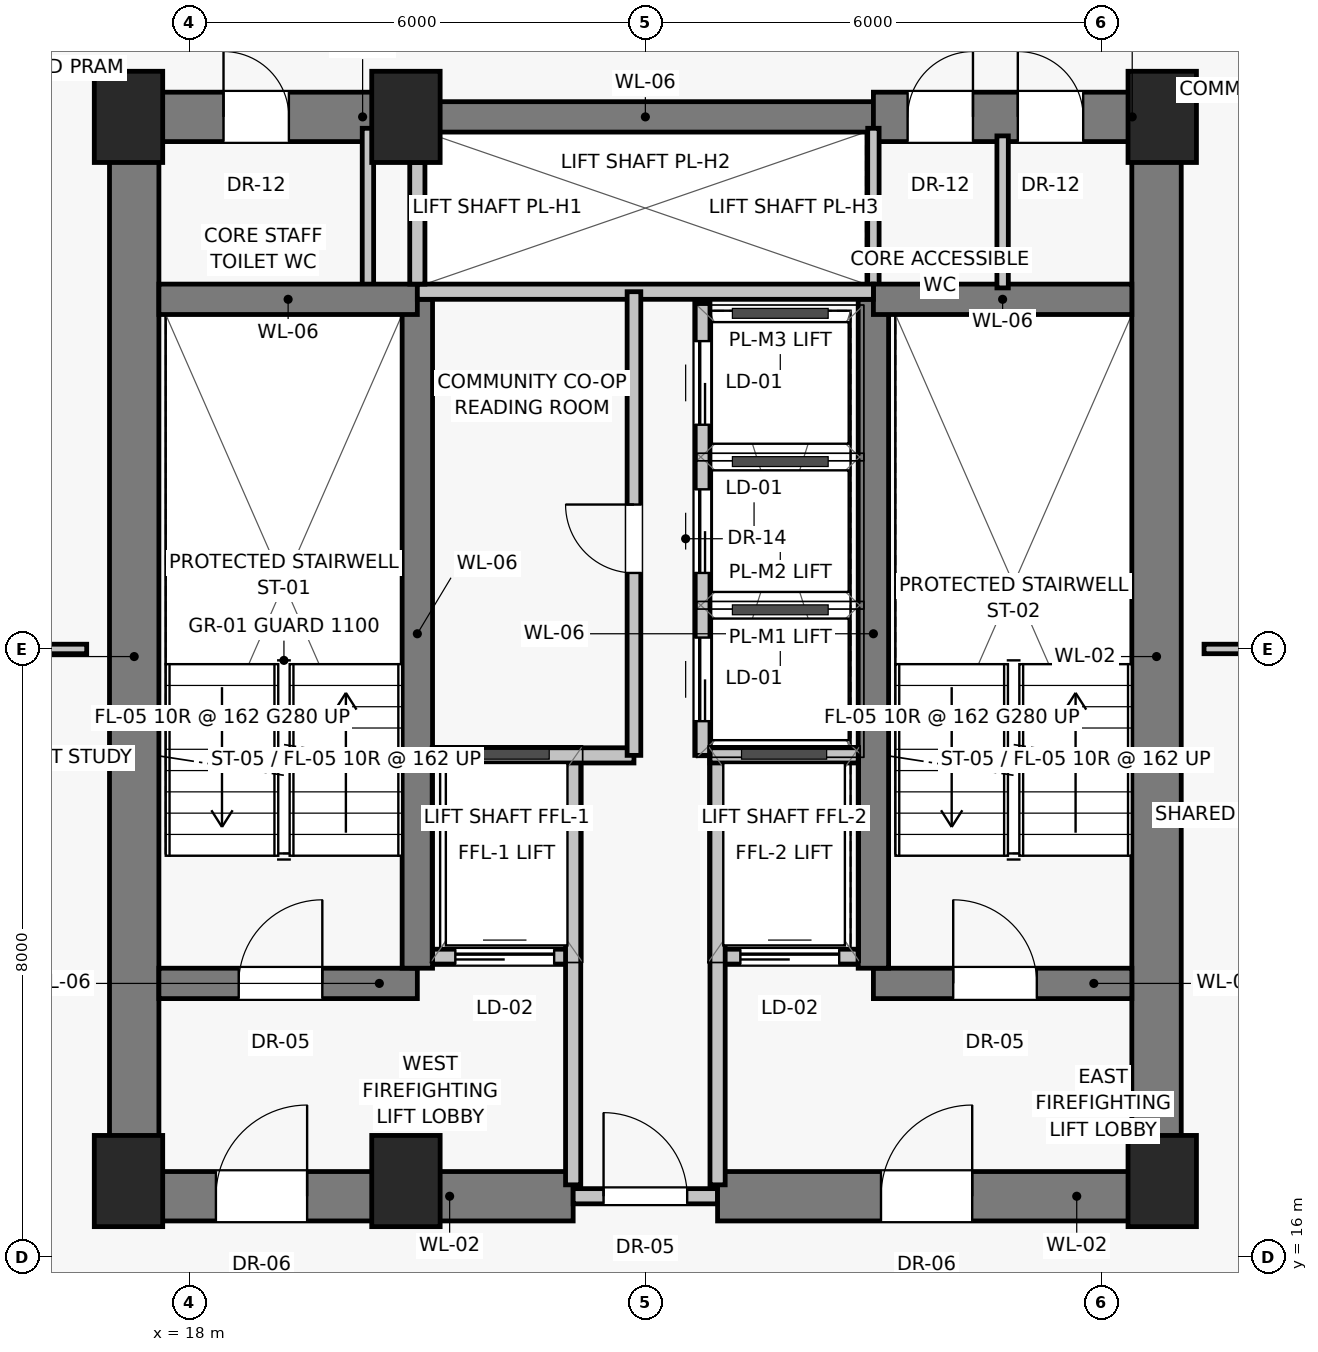
"""IFC4 building model, lengths in metres.
Left out: names, types, materials, properties, quantities, classifications, styles, units other than length and angle.
Written with IfcOpenShell. Run it as: python <this file> out.ifc"""

import sys

from ifc_helpers import new_model, si_unit, direction, frame, frame_2d, origin, origin_2d, place, context, subcontext, project, spatial, rectangle, extrude, source, transform, mapped, element, fill, save


model = new_model("IFC4")
c1 = context("Model", 3, precision=1e-05, world=origin(), true_north=direction((0.0, 1.0)))
c2 = subcontext(c1, "Body", "Model", "MODEL_VIEW")
j1 = project(units=[si_unit("LENGTHUNIT", "METRE"), si_unit("PLANEANGLEUNIT", "RADIAN")], contexts=[c1])
p1 = place(None, origin())
s1 = spatial("IfcSite", under=j1, at=p1, CompositionType="ELEMENT")
p2 = place(p1, origin())
s2 = spatial("IfcBuilding", under=s1, at=p2, CompositionType="ELEMENT")
p3 = place(p2, frame((0.0, 0.0, 123.0)))
s3 = spatial("IfcBuildingStorey", under=s2, at=p3, CompositionType="ELEMENT", Elevation=123.0)
for number, where, z_axis, x_axis in (
    (1, (17.2, 17.0, 0.0), (0.0, 0.0, 1.0), (1.0, 0.0, 0.0)),
    (2, (20.85, 17.0, 0.0), (0.0, 0.0, 1.0), (1.0, 0.0, 0.0)),
    (3, (30.8, 17.0, 0.0), (0.0, 0.0, 1.0), (1.0, 0.0, 0.0)),
    (4, (17.2, 31.0, 0.0), (0.0, 0.0, 1.0), (1.0, 0.0, 0.0)),
    (5, (20.85, 31.0, 0.0), (0.0, 0.0, 1.0), (1.0, 0.0, 0.0)),
    (6, (30.8, 31.0, 0.0), (0.0, 0.0, 1.0), (1.0, 0.0, 0.0)),
):
    element("IfcColumn", number, at=place(p3, frame(where, z_axis=z_axis, x_axis=x_axis)), inside=s3, PredefinedType="PILASTER", context=c2, shape_type="SweptSolid", body=[
        extrude(rectangle(XDim=0.9, YDim=1.2, at=origin_2d()), origin(), (0.0, 0.0, 1.0), 3.25),
    ])
for number, where, z_axis, x_axis in (
    (7, (17.275, 16.8, 0.0), (0.0, 0.0, 1.0), (0.0, 1.0, 0.0)),
    (8, (30.725, 16.8, 0.0), (0.0, 0.0, 1.0), (0.0, 1.0, 0.0)),
):
    element("IfcWall", number, at=place(p3, frame(where, z_axis=z_axis, x_axis=x_axis)), inside=s3, PredefinedType="SHEAR", context=c2, shape_type="SweptSolid", body=[
        extrude(rectangle(XDim=14.2, YDim=0.65, at=frame_2d((7.1, 0.0))), origin(), (0.0, 0.0, 1.0), 3.0),
    ])
p4 = place(p3, frame((17.2, 16.8, 0.0), z_axis=(0.0, 0.0, 1.0), x_axis=(1.0, 0.0, 0.0)))
e9 = element("IfcWall", 9, at=p4, inside=s3, PredefinedType="SHEAR", context=c2, shape_type="SweptSolid", body=[
    extrude(rectangle(XDim=5.85, YDim=0.65, at=frame_2d((2.925, 0.0))), origin(), (0.0, 0.0, 1.0), 3.0),
])
p5 = place(p4, frame((1.15, 0.0, 0.0)))
e10 = element("IfcOpeningElement", 10, at=p5, cuts=e9, PredefinedType="OPENING", context=c2, shape_type="SweptSolid", body=[
    extrude(rectangle(XDim=1.2, YDim=2.03, at=frame_2d((0.6, 1.015))), frame((0.0, 0.335, 0.0), z_axis=(0.0, -1.0, 0.0), x_axis=(1.0, 0.0, 0.0)), (0.0, 0.0, 1.0), 0.67),
])
p6 = place(p3, frame((23.05, 16.8, 0.0), z_axis=(0.0, 0.0, 1.0), x_axis=(1.0, 0.0, 0.0)))
e11 = element("IfcWall", 11, at=p6, inside=s3, PredefinedType="SOLIDWALL", context=c2, shape_type="SweptSolid", body=[
    extrude(rectangle(XDim=1.9, YDim=0.2, at=frame_2d((0.95, 0.0))), origin(), (0.0, 0.0, 1.0), 2.15),
])
p7 = place(p6, frame((0.4, 0.0, 0.0)))
e12 = element("IfcOpeningElement", 12, at=p7, cuts=e11, PredefinedType="OPENING", context=c2, shape_type="SweptSolid", body=[
    extrude(rectangle(XDim=1.1, YDim=2.03, at=frame_2d((0.55, 1.015))), frame((0.0, 0.11, 0.0), z_axis=(0.0, -1.0, 0.0), x_axis=(1.0, 0.0, 0.0)), (0.0, 0.0, 1.0), 0.22),
])
p8 = place(p3, frame((24.95, 16.8, 0.0), z_axis=(0.0, 0.0, 1.0), x_axis=(1.0, 0.0, 0.0)))
e13 = element("IfcWall", 13, at=p8, inside=s3, PredefinedType="SHEAR", context=c2, shape_type="SweptSolid", body=[
    extrude(rectangle(XDim=5.85, YDim=0.65, at=frame_2d((2.925, 0.0))), origin(), (0.0, 0.0, 1.0), 3.0),
])
p9 = place(p8, frame((2.15, 0.0, 0.0)))
e14 = element("IfcOpeningElement", 14, at=p9, cuts=e13, PredefinedType="OPENING", context=c2, shape_type="SweptSolid", body=[
    extrude(rectangle(XDim=1.2, YDim=2.03, at=frame_2d((0.6, 1.015))), frame((0.0, 0.335, 0.0), z_axis=(0.0, -1.0, 0.0), x_axis=(1.0, 0.0, 0.0)), (0.0, 0.0, 1.0), 0.67),
])
p10 = place(p3, frame((17.2, 31.0, 0.0), z_axis=(0.0, 0.0, 1.0), x_axis=(1.0, 0.0, 0.0)))
e15 = element("IfcWall", 15, at=p10, inside=s3, PredefinedType="SHEAR", context=c2, shape_type="SweptSolid", body=[
    extrude(rectangle(XDim=3.8, YDim=0.65, at=frame_2d((1.9, 0.0))), origin(), (0.0, 0.0, 1.0), 3.0),
])
p11 = place(p10, frame((1.25, 0.0, 0.0)))
e16 = element("IfcOpeningElement", 16, at=p11, cuts=e15, PredefinedType="OPENING", context=c2, shape_type="SweptSolid", body=[
    extrude(rectangle(XDim=0.86, YDim=2.01, at=frame_2d((0.43, 1.005))), frame((0.0, 0.335, 0.0), z_axis=(0.0, -1.0, 0.0), x_axis=(1.0, 0.0, 0.0)), (0.0, 0.0, 1.0), 0.67),
])
p12 = place(p3, frame((21.0, 31.0, 0.0), z_axis=(0.0, 0.0, 1.0), x_axis=(1.0, 0.0, 0.0)))
e17 = element("IfcWall", 17, at=p12, inside=s3, PredefinedType="SHEAR", context=c2, shape_type="SweptSolid", body=[
    extrude(rectangle(XDim=6.0, YDim=0.4, at=frame_2d((3.0, 0.0))), origin(), (0.0, 0.0, 1.0), 3.0),
])
p13 = place(p3, frame((27.0, 31.0, 0.0), z_axis=(0.0, 0.0, 1.0), x_axis=(1.0, 0.0, 0.0)))
e18 = element("IfcWall", 18, at=p13, inside=s3, PredefinedType="SHEAR", context=c2, shape_type="SweptSolid", body=[
    extrude(rectangle(XDim=3.8, YDim=0.65, at=frame_2d((1.9, 0.0))), origin(), (0.0, 0.0, 1.0), 3.0),
])
p14 = place(p13, frame((0.45, 0.0, 0.0)))
e19 = element("IfcOpeningElement", 19, at=p14, cuts=e18, PredefinedType="OPENING", context=c2, shape_type="SweptSolid", body=[
    extrude(rectangle(XDim=0.86, YDim=2.01, at=frame_2d((0.43, 1.005))), frame((0.0, 0.335, 0.0), z_axis=(0.0, -1.0, 0.0), x_axis=(1.0, 0.0, 0.0)), (0.0, 0.0, 1.0), 0.67),
])
p15 = place(p13, frame((1.9, 0.0, 0.0)))
e20 = element("IfcOpeningElement", 20, at=p15, cuts=e18, PredefinedType="OPENING", context=c2, shape_type="SweptSolid", body=[
    extrude(rectangle(XDim=0.86, YDim=2.01, at=frame_2d((0.43, 1.005))), frame((0.0, 0.335, 0.0), z_axis=(0.0, -1.0, 0.0), x_axis=(1.0, 0.0, 0.0)), (0.0, 0.0, 1.0), 0.67),
])
for number, where, z_axis, x_axis in (
    (21, (20.35, 28.65, 0.0), (0.0, 0.0, 1.0), (0.0, 1.0, 0.0)),
    (22, (27.0, 28.65, 0.0), (0.0, 0.0, 1.0), (0.0, 1.0, 0.0)),
):
    element("IfcWall", number, at=place(p3, frame(where, z_axis=z_axis, x_axis=x_axis)), inside=s3, PredefinedType="PARTITIONING", context=c2, shape_type="SweptSolid", body=[
        extrude(rectangle(XDim=2.2, YDim=0.15, at=frame_2d((1.1, 0.0))), origin(), (0.0, 0.0, 1.0), 3.0),
    ])
p16 = place(p3, frame((17.6, 19.6, 0.0), z_axis=(0.0, 0.0, 1.0), x_axis=(1.0, 0.0, 0.0)))
e23 = element("IfcWall", 23, at=p16, inside=s3, PredefinedType="SHEAR", context=c2, shape_type="SweptSolid", body=[
    extrude(rectangle(XDim=3.4, YDim=0.4, at=frame_2d((1.7, 0.0))), origin(), (0.0, 0.0, 1.0), 3.0),
])
p17 = place(p16, frame((1.05, 0.0, 0.0)))
e24 = element("IfcOpeningElement", 24, at=p17, cuts=e23, PredefinedType="OPENING", context=c2, shape_type="SweptSolid", body=[
    extrude(rectangle(XDim=1.1, YDim=2.03, at=frame_2d((0.55, 1.015))), frame((0.0, 0.21, 0.0), z_axis=(0.0, -1.0, 0.0), x_axis=(1.0, 0.0, 0.0)), (0.0, 0.0, 1.0), 0.42),
])
p18 = place(p3, frame((21.2, 19.95, 0.0), z_axis=(0.0, 0.0, 1.0), x_axis=(1.0, 0.0, 0.0)))
e25 = element("IfcWall", 25, at=p18, inside=s3, PredefinedType="SOLIDWALL", context=c2, shape_type="SweptSolid", body=[
    extrude(rectangle(XDim=1.85, YDim=0.2, at=frame_2d((0.925, 0.0))), origin(), (0.0, 0.0, 1.0), 3.0),
])
p19 = place(p18, frame((0.3, 0.0, 0.0)))
e26 = element("IfcOpeningElement", 26, at=p19, cuts=e25, PredefinedType="OPENING", context=c2, shape_type="SweptSolid", body=[
    extrude(rectangle(XDim=1.3, YDim=2.25, at=frame_2d((0.65, 1.125))), frame((0.0, 0.11, 0.0), z_axis=(0.0, -1.0, 0.0), x_axis=(1.0, 0.0, 0.0)), (0.0, 0.0, 1.0), 0.22),
])
p20 = place(p3, frame((24.95, 19.95, 0.0), z_axis=(0.0, 0.0, 1.0), x_axis=(1.0, 0.0, 0.0)))
e27 = element("IfcWall", 27, at=p20, inside=s3, PredefinedType="SOLIDWALL", context=c2, shape_type="SweptSolid", body=[
    extrude(rectangle(XDim=1.85, YDim=0.2, at=frame_2d((0.925, 0.0))), origin(), (0.0, 0.0, 1.0), 3.0),
])
p21 = place(p20, frame((0.3, 0.0, 0.0)))
e28 = element("IfcOpeningElement", 28, at=p21, cuts=e27, PredefinedType="OPENING", context=c2, shape_type="SweptSolid", body=[
    extrude(rectangle(XDim=1.3, YDim=2.25, at=frame_2d((0.65, 1.125))), frame((0.0, 0.11, 0.0), z_axis=(0.0, -1.0, 0.0), x_axis=(1.0, 0.0, 0.0)), (0.0, 0.0, 1.0), 0.22),
])
p22 = place(p3, frame((27.0, 19.6, 0.0), z_axis=(0.0, 0.0, 1.0), x_axis=(1.0, 0.0, 0.0)))
e29 = element("IfcWall", 29, at=p22, inside=s3, PredefinedType="SHEAR", context=c2, shape_type="SweptSolid", body=[
    extrude(rectangle(XDim=3.4, YDim=0.4, at=frame_2d((1.7, 0.0))), origin(), (0.0, 0.0, 1.0), 3.0),
])
p23 = place(p22, frame((1.05, 0.0, 0.0)))
e30 = element("IfcOpeningElement", 30, at=p23, cuts=e29, PredefinedType="OPENING", context=c2, shape_type="SweptSolid", body=[
    extrude(rectangle(XDim=1.1, YDim=2.03, at=frame_2d((0.55, 1.015))), frame((0.0, 0.21, 0.0), z_axis=(0.0, -1.0, 0.0), x_axis=(1.0, 0.0, 0.0)), (0.0, 0.0, 1.0), 0.42),
])
for number, where, z_axis, x_axis in (
    (31, (21.0, 19.8, 0.0), (0.0, 0.0, 1.0), (0.0, 1.0, 0.0)),
    (32, (27.0, 19.8, 0.0), (0.0, 0.0, 1.0), (0.0, 1.0, 0.0)),
):
    element("IfcWall", number, at=place(p3, frame(where, z_axis=z_axis, x_axis=x_axis)), inside=s3, PredefinedType="SHEAR", context=c2, shape_type="SweptSolid", body=[
        extrude(rectangle(XDim=8.8, YDim=0.4, at=frame_2d((4.4, 0.0))), origin(), (0.0, 0.0, 1.0), 3.0),
    ])
for number, where, z_axis, x_axis in (
    (33, (17.6, 28.6, 0.0), (0.0, 0.0, 1.0), (1.0, 0.0, 0.0)),
    (34, (27.0, 28.6, 0.0), (0.0, 0.0, 1.0), (1.0, 0.0, 0.0)),
):
    element("IfcWall", number, at=place(p3, frame(where, z_axis=z_axis, x_axis=x_axis)), inside=s3, PredefinedType="SHEAR", context=c2, shape_type="SweptSolid", body=[
        extrude(rectangle(XDim=3.4, YDim=0.4, at=frame_2d((1.7, 0.0))), origin(), (0.0, 0.0, 1.0), 3.0),
    ])
for number, where, z_axis, x_axis in (
    (35, (23.05, 16.95, 0.0), (0.0, 0.0, 1.0), (0.0, 1.0, 0.0)),
    (36, (24.95, 16.95, 0.0), (0.0, 0.0, 1.0), (0.0, 1.0, 0.0)),
):
    element("IfcWall", number, at=place(p3, frame(where, z_axis=z_axis, x_axis=x_axis)), inside=s3, PredefinedType="SOLIDWALL", context=c2, shape_type="SweptSolid", body=[
        extrude(rectangle(XDim=5.6, YDim=0.2, at=frame_2d((2.8, 0.0))), origin(), (0.0, 0.0, 1.0), 3.0),
    ])
p24 = place(p3, frame((21.2, 22.6, 0.0), z_axis=(0.0, 0.0, 1.0), x_axis=(1.0, 0.0, 0.0)))
e37 = element("IfcWall", 37, at=p24, inside=s3, PredefinedType="SOLIDWALL", context=c2, shape_type="SweptSolid", body=[
    extrude(rectangle(XDim=2.65, YDim=0.2, at=frame_2d((1.325, 0.0))), origin(), (0.0, 0.0, 1.0), 3.0),
])
p25 = place(p3, frame((24.85, 22.6, 0.0), z_axis=(0.0, 0.0, 1.0), x_axis=(1.0, 0.0, 0.0)))
e38 = element("IfcWall", 38, at=p25, inside=s3, PredefinedType="SOLIDWALL", context=c2, shape_type="SweptSolid", body=[
    extrude(rectangle(XDim=1.95, YDim=0.2, at=frame_2d((0.975, 0.0))), origin(), (0.0, 0.0, 1.0), 3.0),
])
p26 = place(p3, frame((21.0, 28.7, 0.0), z_axis=(0.0, 0.0, 1.0), x_axis=(1.0, 0.0, 0.0)))
e39 = element("IfcWall", 39, at=p26, inside=s3, PredefinedType="SOLIDWALL", context=c2, shape_type="SweptSolid", body=[
    extrude(rectangle(XDim=6.0, YDim=0.2, at=frame_2d((3.0, 0.0))), origin(), (0.0, 0.0, 1.0), 3.0),
])
p27 = place(p3, frame((21.0, 28.8, 0.0), z_axis=(0.0, 0.0, 1.0), x_axis=(0.0, 1.0, 0.0)))
e40 = element("IfcWall", 40, at=p27, inside=s3, PredefinedType="SOLIDWALL", context=c2, shape_type="SweptSolid", body=[
    extrude(rectangle(XDim=1.6, YDim=0.2, at=frame_2d((0.8, 0.0))), origin(), (0.0, 0.0, 1.0), 3.0),
])
p28 = place(p3, frame((23.85, 22.6, 0.0), z_axis=(0.0, 0.0, 1.0), x_axis=(0.0, 1.0, 0.0)))
e41 = element("IfcWall", 41, at=p28, inside=s3, PredefinedType="PARTITIONING", context=c2, shape_type="SweptSolid", body=[
    extrude(rectangle(XDim=6.1, YDim=0.18, at=frame_2d((3.05, 0.0))), origin(), (0.0, 0.0, 1.0), 3.0),
])
p29 = place(p28, frame((2.4, 0.0, 0.0)))
e42 = element("IfcOpeningElement", 42, at=p29, cuts=e41, PredefinedType="OPENING", context=c2, shape_type="SweptSolid", body=[
    extrude(rectangle(XDim=0.9, YDim=2.01, at=frame_2d((0.45, 1.005))), frame((0.0, 0.1, 0.0), z_axis=(0.0, -1.0, 0.0), x_axis=(1.0, 0.0, 0.0)), (0.0, 0.0, 1.0), 0.2),
])
p30 = place(p3, frame((24.75, 22.6, 0.0), z_axis=(0.0, 0.0, 1.0), x_axis=(0.0, 1.0, 0.0)))
e43 = element("IfcWall", 43, at=p30, inside=s3, PredefinedType="SOLIDWALL", context=c2, shape_type="SweptSolid", body=[
    extrude(rectangle(XDim=5.95, YDim=0.2, at=frame_2d((2.975, 0.0))), origin(), (0.0, 0.0, 1.0), 3.0),
])
p31 = place(p30, frame((0.45, 0.0, 0.0)))
e44 = element("IfcOpeningElement", 44, at=p31, cuts=e43, PredefinedType="OPENING", context=c2, shape_type="SweptSolid", body=[
    extrude(rectangle(XDim=1.1, YDim=2.08, at=frame_2d((0.55, 1.04))), frame((0.0, 0.11, 0.0), z_axis=(0.0, -1.0, 0.0), x_axis=(1.0, 0.0, 0.0)), (0.0, 0.0, 1.0), 0.22),
])
p32 = place(p30, frame((2.4, 0.0, 0.0)))
e45 = element("IfcOpeningElement", 45, at=p32, cuts=e43, PredefinedType="OPENING", context=c2, shape_type="SweptSolid", body=[
    extrude(rectangle(XDim=1.1, YDim=2.08, at=frame_2d((0.55, 1.04))), frame((0.0, 0.11, 0.0), z_axis=(0.0, -1.0, 0.0), x_axis=(1.0, 0.0, 0.0)), (0.0, 0.0, 1.0), 0.22),
])
p33 = place(p30, frame((4.35, 0.0, 0.0)))
e46 = element("IfcOpeningElement", 46, at=p33, cuts=e43, PredefinedType="OPENING", context=c2, shape_type="SweptSolid", body=[
    extrude(rectangle(XDim=1.1, YDim=2.08, at=frame_2d((0.55, 1.04))), frame((0.0, 0.11, 0.0), z_axis=(0.0, -1.0, 0.0), x_axis=(1.0, 0.0, 0.0)), (0.0, 0.0, 1.0), 0.22),
])
p34 = place(p3, frame((28.7, 28.75, 0.0), z_axis=(0.0, 0.0, 1.0), x_axis=(0.0, 1.0, 0.0)))
e47 = element("IfcWall", 47, at=p34, inside=s3, PredefinedType="PARTITIONING", context=c2, shape_type="SweptSolid", body=[
    extrude(rectangle(XDim=2.0, YDim=0.15, at=frame_2d((1.0, 0.0))), origin(), (0.0, 0.0, 1.0), 3.0),
])
for number, where, z_axis, x_axis in (
    (48, (14.55, 24.0, 0.0), (0.0, 0.0, 1.0), (1.0, 0.0, 0.0)),
    (49, (31.35, 24.0, 0.0), (0.0, 0.0, 1.0), (1.0, 0.0, 0.0)),
):
    element("IfcWall", number, at=place(p3, frame(where, z_axis=z_axis, x_axis=x_axis)), inside=s3, PredefinedType="PARTITIONING", context=c2, shape_type="SweptSolid", body=[
        extrude(rectangle(XDim=2.1, YDim=0.125, at=frame_2d((1.05, 0.0))), origin(), (0.0, 0.0, 1.0), 3.0),
    ])
m1 = source(origin(), c2, "Body", "SweptSolid", [
    extrude(rectangle(XDim=1.2, YDim=2.03, at=frame_2d((0.6, 1.015))), frame((0.0, 0.025, 0.0), z_axis=(0.0, -1.0, 0.0), x_axis=(1.0, 0.0, 0.0)), (0.0, 0.0, 1.0), 0.05),
])
p35 = place(p5, origin())
e50 = element("IfcDoor", 50, at=p35, inside=s3, OperationType="SINGLE_SWING_RIGHT", PredefinedType="DOOR", context=c2, shape_type="MappedRepresentation", body=[
    mapped(m1, transform((0.0, 0.0, 0.0), scale=1.0)),
])
fill(e10, e50)
m2 = source(origin(), c2, "Body", "SweptSolid", [
    extrude(rectangle(XDim=1.1, YDim=2.03, at=frame_2d((0.55, 1.015))), frame((0.0, 0.025, 0.0), z_axis=(0.0, -1.0, 0.0), x_axis=(1.0, 0.0, 0.0)), (0.0, 0.0, 1.0), 0.05),
])
p36 = place(p7, origin())
e51 = element("IfcDoor", 51, at=p36, inside=s3, OperationType="SINGLE_SWING_LEFT", PredefinedType="DOOR", context=c2, shape_type="MappedRepresentation", body=[
    mapped(m2, transform((0.0, 0.0, 0.0), scale=1.0)),
])
fill(e12, e51)
p37 = place(p9, origin())
e52 = element("IfcDoor", 52, at=p37, inside=s3, OperationType="SINGLE_SWING_RIGHT", PredefinedType="DOOR", context=c2, shape_type="MappedRepresentation", body=[
    mapped(m1, transform((0.0, 0.0, 0.0), scale=1.0)),
])
fill(e14, e52)
m3 = source(origin(), c2, "Body", "SweptSolid", [
    extrude(rectangle(XDim=0.86, YDim=2.01, at=frame_2d((0.43, 1.005))), frame((0.0, 0.025, 0.0), z_axis=(0.0, -1.0, 0.0), x_axis=(1.0, 0.0, 0.0)), (0.0, 0.0, 1.0), 0.05),
])
p38 = place(p11, origin())
e53 = element("IfcDoor", 53, at=p38, inside=s3, OperationType="SINGLE_SWING_LEFT", PredefinedType="DOOR", context=c2, shape_type="MappedRepresentation", body=[
    mapped(m3, transform((0.0, 0.0, 0.0), scale=1.0)),
])
fill(e16, e53)
p39 = place(p14, origin())
e54 = element("IfcDoor", 54, at=p39, inside=s3, OperationType="SINGLE_SWING_RIGHT", PredefinedType="DOOR", context=c2, shape_type="MappedRepresentation", body=[
    mapped(m3, transform((0.0, 0.0, 0.0), scale=1.0)),
])
fill(e19, e54)
p40 = place(p15, origin())
e55 = element("IfcDoor", 55, at=p40, inside=s3, OperationType="SINGLE_SWING_LEFT", PredefinedType="DOOR", context=c2, shape_type="MappedRepresentation", body=[
    mapped(m3, transform((0.0, 0.0, 0.0), scale=1.0)),
])
fill(e20, e55)
p41 = place(p17, origin())
e56 = element("IfcDoor", 56, at=p41, inside=s3, OperationType="SINGLE_SWING_RIGHT", PredefinedType="DOOR", context=c2, shape_type="MappedRepresentation", body=[
    mapped(m2, transform((0.0, 0.0, 0.0), scale=1.0)),
])
fill(e24, e56)
m4 = source(origin(), c2, "Body", "SweptSolid", [
    extrude(rectangle(XDim=1.3, YDim=2.25, at=frame_2d((0.65, 1.125))), frame((0.0, 0.025, 0.0), z_axis=(0.0, -1.0, 0.0), x_axis=(1.0, 0.0, 0.0)), (0.0, 0.0, 1.0), 0.05),
])
p42 = place(p19, origin())
e57 = element("IfcDoor", 57, at=p42, inside=s3, OperationType="SLIDING_TO_LEFT", PredefinedType="DOOR", context=c2, shape_type="MappedRepresentation", body=[
    mapped(m4, transform((0.0, 0.0, 0.0), scale=1.0)),
])
fill(e26, e57)
p43 = place(p21, origin())
e58 = element("IfcDoor", 58, at=p43, inside=s3, OperationType="SLIDING_TO_LEFT", PredefinedType="DOOR", context=c2, shape_type="MappedRepresentation", body=[
    mapped(m4, transform((0.0, 0.0, 0.0), scale=1.0)),
])
fill(e28, e58)
p44 = place(p23, origin())
e59 = element("IfcDoor", 59, at=p44, inside=s3, OperationType="SINGLE_SWING_LEFT", PredefinedType="DOOR", context=c2, shape_type="MappedRepresentation", body=[
    mapped(m2, transform((0.0, 0.0, 0.0), scale=1.0)),
])
fill(e30, e59)
m5 = source(origin(), c2, "Body", "SweptSolid", [
    extrude(rectangle(XDim=0.9, YDim=2.01, at=frame_2d((0.45, 1.005))), frame((0.0, 0.025, 0.0), z_axis=(0.0, -1.0, 0.0), x_axis=(1.0, 0.0, 0.0)), (0.0, 0.0, 1.0), 0.05),
])
p45 = place(p29, origin())
e60 = element("IfcDoor", 60, at=p45, inside=s3, OperationType="SINGLE_SWING_RIGHT", PredefinedType="DOOR", context=c2, shape_type="MappedRepresentation", body=[
    mapped(m5, transform((0.0, 0.0, 0.0), scale=1.0)),
])
fill(e42, e60)
m6 = source(origin(), c2, "Body", "SweptSolid", [
    extrude(rectangle(XDim=1.1, YDim=2.08, at=frame_2d((0.55, 1.04))), frame((0.0, 0.025, 0.0), z_axis=(0.0, -1.0, 0.0), x_axis=(1.0, 0.0, 0.0)), (0.0, 0.0, 1.0), 0.05),
])
p46 = place(p31, origin())
e61 = element("IfcDoor", 61, at=p46, inside=s3, OperationType="SLIDING_TO_LEFT", PredefinedType="DOOR", context=c2, shape_type="MappedRepresentation", body=[
    mapped(m6, transform((0.0, 0.0, 0.0), scale=1.0)),
])
fill(e44, e61)
p47 = place(p32, origin())
e62 = element("IfcDoor", 62, at=p47, inside=s3, OperationType="SLIDING_TO_LEFT", PredefinedType="DOOR", context=c2, shape_type="MappedRepresentation", body=[
    mapped(m6, transform((0.0, 0.0, 0.0), scale=1.0)),
])
fill(e45, e62)
p48 = place(p33, origin())
e63 = element("IfcDoor", 63, at=p48, inside=s3, OperationType="SLIDING_TO_LEFT", PredefinedType="DOOR", context=c2, shape_type="MappedRepresentation", body=[
    mapped(m6, transform((0.0, 0.0, 0.0), scale=1.0)),
])
fill(e46, e63)
save(model, sys.argv[1])
